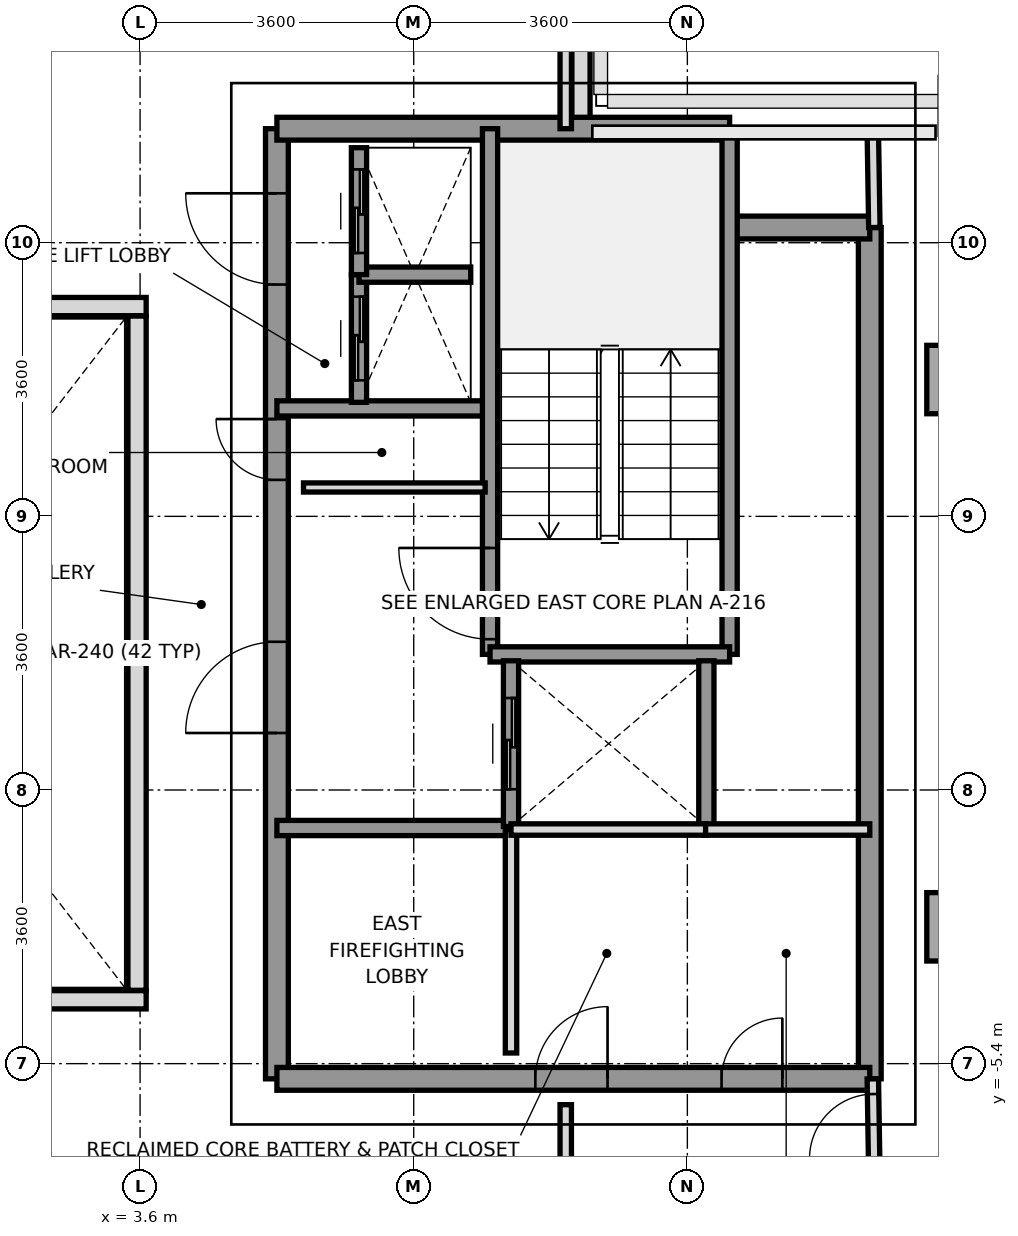
"""IFC4 building model, lengths in metres.
Left out: names, types, materials, properties, quantities, classifications, styles, units other than length and angle.
Written with IfcOpenShell. Run it as: python <this file> out.ifc"""

import sys

from ifc_helpers import new_model, si_unit, direction, frame, frame_2d, origin, origin_2d, place, context, subcontext, project, spatial, rectangle, extrude, source, transform, mapped, element, fill, save


model = new_model("IFC4")
c1 = context("Model", 3, precision=1e-05, world=origin(), true_north=direction((0.0, 1.0)))
c2 = subcontext(c1, "Body", "Model", "MODEL_VIEW")
j1 = project(units=[si_unit("LENGTHUNIT", "METRE"), si_unit("PLANEANGLEUNIT", "RADIAN")], contexts=[c1])
p1 = place(None, origin())
s1 = spatial("IfcSite", under=j1, at=p1, CompositionType="ELEMENT")
p2 = place(p1, origin())
s2 = spatial("IfcBuilding", under=s1, at=p2, CompositionType="ELEMENT")
p3 = place(p2, frame((0.0, 0.0, 239.6)))
s3 = spatial("IfcBuildingStorey", under=s2, at=p3, CompositionType="ELEMENT", Elevation=239.6)
m1 = source(origin(), c2, "Body", "SweptSolid", [
    extrude(rectangle(XDim=0.9, YDim=0.9, at=origin_2d()), origin(), (0.0, 0.0, 1.0), 3.01),
])
for number, where, z_axis, x_axis in (
    (1, (14.4, -3.6, 0.0), (0.0, 0.0, 1.0), (1.0, 0.0, 0.0)),
    (2, (14.4, 3.6, 0.0), (0.0, 0.0, 1.0), (1.0, 0.0, 0.0)),
):
    element("IfcColumn", number, at=place(p3, frame(where, z_axis=z_axis, x_axis=x_axis)), inside=s3, PredefinedType="COLUMN", context=c2, shape_type="MappedRepresentation", body=[
        mapped(m1, transform((0.0, 0.0, 0.0), x_axis=(1.0, 0.0, 0.0), y_axis=(0.0, 1.0, 0.0), z_axis=(0.0, 0.0, 1.0), scale=1.0)),
    ])
p4 = place(p3, frame((9.4, 8.622, 0.0), z_axis=(0.0, 0.0, 1.0), x_axis=(0.0, -1.0, 0.0)))
e3 = element("IfcWall", 3, at=p4, inside=s3, PredefinedType="PARAPET", context=c2, shape_type="SweptSolid", body=[
    extrude(rectangle(XDim=1.669, YDim=0.24, at=frame_2d((0.834, 0.0))), origin(), (0.0, 0.0, 1.0), 1.15),
])
p5 = place(p3, frame((13.2, -5.6, 0.0), z_axis=(0.0, 0.0, 1.0), x_axis=(0.0, 1.0, 0.0)))
e4 = element("IfcWall", 4, at=p5, inside=s3, PredefinedType="SHEAR", context=c2, shape_type="SweptSolid", body=[
    extrude(rectangle(XDim=11.2, YDim=0.3, at=frame_2d((5.6, 0.0))), origin(), (0.0, 0.0, 1.0), 3.01),
])
p6 = place(p3, frame((5.4, -5.6, 0.0), z_axis=(0.0, 0.0, 1.0), x_axis=(0.0, 1.0, 0.0)))
e5 = element("IfcWall", 5, at=p6, inside=s3, PredefinedType="SHEAR", context=c2, shape_type="SweptSolid", body=[
    extrude(rectangle(XDim=12.5, YDim=0.3, at=frame_2d((6.25, 0.0))), origin(), (0.0, 0.0, 1.0), 3.01),
])
p7 = place(p6, frame((4.55, 0.0, 0.0)))
e6 = element("IfcOpeningElement", 6, at=p7, cuts=e5, PredefinedType="OPENING", context=c2, shape_type="SweptSolid", body=[
    extrude(rectangle(XDim=1.2, YDim=2.2, at=frame_2d((0.6, 1.1))), frame((0.0, 0.16, 0.0), z_axis=(0.0, -1.0, 0.0), x_axis=(1.0, 0.0, 0.0)), (0.0, 0.0, 1.0), 0.32),
])
p8 = place(p6, frame((10.45, 0.0, 0.0)))
e7 = element("IfcOpeningElement", 7, at=p8, cuts=e5, PredefinedType="OPENING", context=c2, shape_type="SweptSolid", body=[
    extrude(rectangle(XDim=1.2, YDim=2.2, at=frame_2d((0.6, 1.1))), frame((0.0, 0.16, 0.0), z_axis=(0.0, -1.0, 0.0), x_axis=(1.0, 0.0, 0.0)), (0.0, 0.0, 1.0), 0.32),
])
p9 = place(p6, frame((7.88, 0.0, 0.0)))
e8 = element("IfcOpeningElement", 8, at=p9, cuts=e5, PredefinedType="OPENING", context=c2, shape_type="SweptSolid", body=[
    extrude(rectangle(XDim=0.8, YDim=2.1, at=frame_2d((0.4, 1.05))), frame((0.0, 0.16, 0.0), z_axis=(0.0, -1.0, 0.0), x_axis=(1.0, 0.0, 0.0)), (0.0, 0.0, 1.0), 0.32),
])
p10 = place(p3, frame((5.4, 6.9, 0.0), z_axis=(0.0, 0.0, 1.0), x_axis=(1.0, 0.0, 0.0)))
e9 = element("IfcWall", 9, at=p10, inside=s3, PredefinedType="SHEAR", context=c2, shape_type="SweptSolid", body=[
    extrude(rectangle(XDim=5.956, YDim=0.3, at=frame_2d((2.978, 0.0))), origin(), (0.0, 0.0, 1.0), 3.01),
])
p11 = place(p3, frame((11.356, 5.6, 0.0), z_axis=(0.0, 0.0, 1.0), x_axis=(1.0, 0.0, 0.0)))
e10 = element("IfcWall", 10, at=p11, inside=s3, PredefinedType="SHEAR", context=c2, shape_type="SweptSolid", body=[
    extrude(rectangle(XDim=1.844, YDim=0.3, at=frame_2d((0.922, 0.0))), origin(), (0.0, 0.0, 1.0), 3.01),
])
p12 = place(p3, frame((5.4, -5.6, 0.0), z_axis=(0.0, 0.0, 1.0), x_axis=(1.0, 0.0, 0.0)))
e11 = element("IfcWall", 11, at=p12, inside=s3, PredefinedType="SHEAR", context=c2, shape_type="SweptSolid", body=[
    extrude(rectangle(XDim=7.8, YDim=0.3, at=frame_2d((3.9, 0.0))), origin(), (0.0, 0.0, 1.0), 3.01),
])
p13 = place(p12, frame((5.85, 0.0, 0.0)))
e12 = element("IfcOpeningElement", 12, at=p13, cuts=e11, PredefinedType="OPENING", context=c2, shape_type="SweptSolid", body=[
    extrude(rectangle(XDim=0.8, YDim=2.1, at=frame_2d((0.4, 1.05))), frame((0.0, 0.16, 0.0), z_axis=(0.0, -1.0, 0.0), x_axis=(1.0, 0.0, 0.0)), (0.0, 0.0, 1.0), 0.32),
])
p14 = place(p12, frame((3.4, 0.0, 0.0)))
e13 = element("IfcOpeningElement", 13, at=p14, cuts=e11, PredefinedType="OPENING", context=c2, shape_type="SweptSolid", body=[
    extrude(rectangle(XDim=0.95, YDim=2.15, at=frame_2d((0.475, 1.075))), frame((0.0, 0.16, 0.0), z_axis=(0.0, -1.0, 0.0), x_axis=(1.0, 0.0, 0.0)), (0.0, 0.0, 1.0), 0.32),
])
p15 = place(p3, frame((5.4, 3.22, 0.0), z_axis=(0.0, 0.0, 1.0), x_axis=(1.0, 0.0, 0.0)))
e14 = element("IfcWall", 14, at=p15, inside=s3, PredefinedType="SOLIDWALL", context=c2, shape_type="SweptSolid", body=[
    extrude(rectangle(XDim=2.78, YDim=0.2, at=frame_2d((1.39, 0.0))), origin(), (0.0, 0.0, 1.0), 3.01),
])
p16 = place(p3, frame((5.4, -2.3, 0.0), z_axis=(0.0, 0.0, 1.0), x_axis=(1.0, 0.0, 0.0)))
e15 = element("IfcWall", 15, at=p16, inside=s3, PredefinedType="SOLIDWALL", context=c2, shape_type="SweptSolid", body=[
    extrude(rectangle(XDim=3.08, YDim=0.2, at=frame_2d((1.54, 0.0))), origin(), (0.0, 0.0, 1.0), 3.01),
])
p17 = place(p3, frame((8.204, -0.016, 0.0), z_axis=(0.0, 0.0, 1.0), x_axis=(0.0, 1.0, 0.0)))
e16 = element("IfcWall", 16, at=p17, inside=s3, PredefinedType="SOLIDWALL", context=c2, shape_type="SweptSolid", body=[
    extrude(rectangle(XDim=6.916, YDim=0.2, at=frame_2d((3.458, 0.0))), origin(), (0.0, 0.0, 1.0), 3.01),
])
p18 = place(p17, frame((0.2, 0.0, 0.0)))
e17 = element("IfcOpeningElement", 17, at=p18, cuts=e16, PredefinedType="OPENING", context=c2, shape_type="SweptSolid", body=[
    extrude(rectangle(XDim=1.2, YDim=2.2, at=frame_2d((0.6, 1.1))), frame((0.0, 0.11, 0.0), z_axis=(0.0, -1.0, 0.0), x_axis=(1.0, 0.0, 0.0)), (0.0, 0.0, 1.0), 0.22),
])
p19 = place(p3, frame((11.356, -0.016, 0.0), z_axis=(0.0, 0.0, 1.0), x_axis=(0.0, 1.0, 0.0)))
e18 = element("IfcWall", 18, at=p19, inside=s3, PredefinedType="SOLIDWALL", context=c2, shape_type="SweptSolid", body=[
    extrude(rectangle(XDim=6.916, YDim=0.2, at=frame_2d((3.458, 0.0))), origin(), (0.0, 0.0, 1.0), 3.01),
])
p20 = place(p3, frame((8.204, -0.016, 0.0), z_axis=(0.0, 0.0, 1.0), x_axis=(1.0, 0.0, 0.0)))
e19 = element("IfcWall", 19, at=p20, inside=s3, PredefinedType="SOLIDWALL", context=c2, shape_type="SweptSolid", body=[
    extrude(rectangle(XDim=3.152, YDim=0.2, at=frame_2d((1.576, 0.0))), origin(), (0.0, 0.0, 1.0), 3.01),
])
p21 = place(p3, frame((8.48, -2.28, 0.0), z_axis=(0.0, 0.0, 1.0), x_axis=(0.0, 1.0, 0.0)))
e20 = element("IfcWall", 20, at=p21, inside=s3, PredefinedType="SOLIDWALL", context=c2, shape_type="SweptSolid", body=[
    extrude(rectangle(XDim=2.18, YDim=0.2, at=frame_2d((1.09, 0.0))), origin(), (0.0, 0.0, 1.0), 3.01),
])
p22 = place(p21, frame((0.49, 0.0, 0.0)))
e21 = element("IfcOpeningElement", 21, at=p22, cuts=e20, PredefinedType="OPENING", context=c2, shape_type="SweptSolid", body=[
    extrude(rectangle(XDim=1.2, YDim=2.2, at=frame_2d((0.6, 1.1))), frame((0.0, 0.11, 0.0), z_axis=(0.0, -1.0, 0.0), x_axis=(1.0, 0.0, 0.0)), (0.0, 0.0, 1.0), 0.22),
])
p23 = place(p3, frame((11.05, -2.28, 0.0), z_axis=(0.0, 0.0, 1.0), x_axis=(0.0, 1.0, 0.0)))
e22 = element("IfcWall", 22, at=p23, inside=s3, PredefinedType="SOLIDWALL", context=c2, shape_type="SweptSolid", body=[
    extrude(rectangle(XDim=2.18, YDim=0.2, at=frame_2d((1.09, 0.0))), origin(), (0.0, 0.0, 1.0), 3.01),
])
p24 = place(p3, frame((6.48, 3.3, 0.0), z_axis=(0.0, 0.0, 1.0), x_axis=(0.0, 1.0, 0.0)))
e23 = element("IfcWall", 23, at=p24, inside=s3, PredefinedType="SOLIDWALL", context=c2, shape_type="SweptSolid", body=[
    extrude(rectangle(XDim=1.68, YDim=0.2, at=frame_2d((0.84, 0.0))), origin(), (0.0, 0.0, 1.0), 3.01),
])
p25 = place(p24, frame((0.29, 0.0, 0.0)))
e24 = element("IfcOpeningElement", 24, at=p25, cuts=e23, PredefinedType="OPENING", context=c2, shape_type="SweptSolid", body=[
    extrude(rectangle(XDim=1.1, YDim=2.2, at=frame_2d((0.55, 1.1))), frame((0.0, 0.11, 0.0), z_axis=(0.0, -1.0, 0.0), x_axis=(1.0, 0.0, 0.0)), (0.0, 0.0, 1.0), 0.22),
])
p26 = place(p3, frame((6.48, 4.98, 0.0), z_axis=(0.0, 0.0, 1.0), x_axis=(1.0, 0.0, 0.0)))
e25 = element("IfcWall", 25, at=p26, inside=s3, PredefinedType="SOLIDWALL", context=c2, shape_type="SweptSolid", body=[
    extrude(rectangle(XDim=1.47, YDim=0.2, at=frame_2d((0.735, 0.0))), origin(), (0.0, 0.0, 1.0), 3.01),
])
p27 = place(p3, frame((6.48, 4.98, 0.0), z_axis=(0.0, 0.0, 1.0), x_axis=(0.0, 1.0, 0.0)))
e26 = element("IfcWall", 26, at=p27, inside=s3, PredefinedType="SOLIDWALL", context=c2, shape_type="SweptSolid", body=[
    extrude(rectangle(XDim=1.67, YDim=0.2, at=frame_2d((0.835, 0.0))), origin(), (0.0, 0.0, 1.0), 3.01),
])
p28 = place(p27, frame((0.285, 0.0, 0.0)))
e27 = element("IfcOpeningElement", 27, at=p28, cuts=e26, PredefinedType="OPENING", context=c2, shape_type="SweptSolid", body=[
    extrude(rectangle(XDim=1.1, YDim=2.2, at=frame_2d((0.55, 1.1))), frame((0.0, 0.11, 0.0), z_axis=(0.0, -1.0, 0.0), x_axis=(1.0, 0.0, 0.0)), (0.0, 0.0, 1.0), 0.22),
])
p29 = place(p3, frame((5.75, 2.18, 0.0), z_axis=(0.0, 0.0, 1.0), x_axis=(1.0, 0.0, 0.0)))
e28 = element("IfcWall", 28, at=p29, inside=s3, PredefinedType="PARTITIONING", context=c2, shape_type="SweptSolid", body=[
    extrude(rectangle(XDim=2.39, YDim=0.12, at=frame_2d((1.195, 0.0))), origin(), (0.0, 0.0, 1.0), 3.01),
])
p30 = place(p3, frame((11.02, -2.32, 0.0), z_axis=(0.0, 0.0, 1.0), x_axis=(1.0, 0.0, 0.0)))
e29 = element("IfcWall", 29, at=p30, inside=s3, PredefinedType="PARTITIONING", context=c2, shape_type="SweptSolid", body=[
    extrude(rectangle(XDim=2.18, YDim=0.15, at=frame_2d((1.09, 0.0))), origin(), (0.0, 0.0, 1.0), 3.01),
])
p31 = place(p3, frame((8.48, -5.26, 0.0), z_axis=(0.0, 0.0, 1.0), x_axis=(0.0, 1.0, 0.0)))
e30 = element("IfcWall", 30, at=p31, inside=s3, PredefinedType="PARTITIONING", context=c2, shape_type="SweptSolid", body=[
    extrude(rectangle(XDim=2.94, YDim=0.15, at=frame_2d((1.47, 0.0))), origin(), (0.0, 0.0, 1.0), 3.01),
])
p32 = place(p3, frame((8.48, -2.32, 0.0), z_axis=(0.0, 0.0, 1.0), x_axis=(1.0, 0.0, 0.0)))
e31 = element("IfcWall", 31, at=p32, inside=s3, PredefinedType="PARTITIONING", context=c2, shape_type="SweptSolid", body=[
    extrude(rectangle(XDim=2.56, YDim=0.15, at=frame_2d((1.28, 0.0))), origin(), (0.0, 0.0, 1.0), 3.01),
])
p33 = place(p3, frame((9.2, 6.9, 0.0), z_axis=(0.0, 0.0, 1.0), x_axis=(0.0, 1.0, 0.0)))
e32 = element("IfcWall", 32, at=p33, inside=s3, PredefinedType="PARTITIONING", context=c2, shape_type="SweptSolid", body=[
    extrude(rectangle(XDim=3.38, YDim=0.15, at=frame_2d((1.69, 0.0))), origin(), (0.0, 0.0, 1.0), 2.61),
])
p34 = place(p3, frame((9.2, -10.28, 0.0), z_axis=(0.0, 0.0, 1.0), x_axis=(0.0, 1.0, 0.0)))
e33 = element("IfcWall", 33, at=p34, inside=s3, PredefinedType="PARTITIONING", context=c2, shape_type="SweptSolid", body=[
    extrude(rectangle(XDim=4.34, YDim=0.15, at=frame_2d((2.17, 0.0))), origin(), (0.0, 0.0, 1.0), 2.61),
])
p35 = place(p3, frame((13.26, 5.6, 0.0), z_axis=(0.0, 0.0, 1.0), x_axis=(-0.016013571389, 0.999871774545, 0.0)))
e34 = element("IfcWall", 34, at=p35, inside=s3, PredefinedType="PARTITIONING", context=c2, shape_type="SweptSolid", body=[
    extrude(rectangle(XDim=1.25, YDim=0.15, at=frame_2d((0.625, 0.0))), origin(), (0.0, 0.0, 1.0), 3.01),
])
p36 = place(p3, frame((13.26, -6.85, 0.0), z_axis=(0.0, 0.0, 1.0), x_axis=(-0.016013571389, 0.999871774545, 0.0)))
e35 = element("IfcWall", 35, at=p36, inside=s3, PredefinedType="PARTITIONING", context=c2, shape_type="SweptSolid", body=[
    extrude(rectangle(XDim=1.25, YDim=0.15, at=frame_2d((0.625, 0.0))), origin(), (0.0, 0.0, 1.0), 3.01),
])
p37 = place(p36, frame((0.2, 0.0, 0.0)))
e36 = element("IfcOpeningElement", 36, at=p37, cuts=e35, PredefinedType="OPENING", context=c2, shape_type="SweptSolid", body=[
    extrude(rectangle(XDim=0.85, YDim=2.1, at=frame_2d((0.425, 1.05))), frame((0.0, 0.085, 0.0), z_axis=(0.0, -1.0, 0.0), x_axis=(1.0, 0.0, 0.0)), (0.0, 0.0, 1.0), 0.17),
])
for number, where, z_axis, x_axis in (
    (37, (-3.68, -4.56, 0.0), (0.0, 0.0, 1.0), (1.0, 0.0, 0.0)),
    (38, (-3.68, 4.56, 0.0), (0.0, 0.0, 1.0), (1.0, 0.0, 0.0)),
):
    element("IfcWall", number, at=place(p3, frame(where, z_axis=z_axis, x_axis=x_axis)), inside=s3, PredefinedType="PARAPET", context=c2, shape_type="SweptSolid", body=[
        extrude(rectangle(XDim=7.36, YDim=0.24, at=frame_2d((3.68, 0.0))), origin(), (0.0, 0.0, 1.0), 1.15),
    ])
p38 = place(p3, frame((3.56, -4.435, 0.0), z_axis=(0.0, 0.0, 1.0), x_axis=(0.0, 1.0, 0.0)))
e39 = element("IfcWall", 39, at=p38, inside=s3, PredefinedType="PARAPET", context=c2, shape_type="SweptSolid", body=[
    extrude(rectangle(XDim=8.87, YDim=0.24, at=frame_2d((4.435, 0.0))), origin(), (0.0, 0.0, 1.0), 1.15),
])
m2 = source(origin(), c2, "Body", "SweptSolid", [
    extrude(rectangle(XDim=1.2, YDim=2.2, at=frame_2d((0.6, 1.1))), frame((0.0, 0.025, 0.0), z_axis=(0.0, -1.0, 0.0), x_axis=(1.0, 0.0, 0.0)), (0.0, 0.0, 1.0), 0.05),
])
p39 = place(p18, origin())
e40 = element("IfcDoor", 40, at=p39, inside=s3, OperationType="SINGLE_SWING_RIGHT", PredefinedType="DOOR", context=c2, shape_type="MappedRepresentation", body=[
    mapped(m2, transform((0.0, 0.0, 0.0), x_axis=(1.0, 0.0, 0.0), y_axis=(0.0, 1.0, 0.0), z_axis=(0.0, 0.0, 1.0), scale=1.0)),
])
fill(e17, e40)
p40 = place(p7, origin())
e41 = element("IfcDoor", 41, at=p40, inside=s3, OperationType="SINGLE_SWING_LEFT", PredefinedType="DOOR", context=c2, shape_type="MappedRepresentation", body=[
    mapped(m2, transform((0.0, 0.0, 0.0), x_axis=(1.0, 0.0, 0.0), y_axis=(0.0, 1.0, 0.0), z_axis=(0.0, 0.0, 1.0), scale=1.0)),
])
fill(e6, e41)
p41 = place(p8, origin())
e42 = element("IfcDoor", 42, at=p41, inside=s3, OperationType="SINGLE_SWING_RIGHT", PredefinedType="DOOR", context=c2, shape_type="MappedRepresentation", body=[
    mapped(m2, transform((0.0, 0.0, 0.0), x_axis=(1.0, 0.0, 0.0), y_axis=(0.0, 1.0, 0.0), z_axis=(0.0, 0.0, 1.0), scale=1.0)),
])
fill(e7, e42)
m3 = source(origin(), c2, "Body", "SweptSolid", [
    extrude(rectangle(XDim=0.8, YDim=2.1, at=frame_2d((0.4, 1.05))), frame((0.0, 0.025, 0.0), z_axis=(0.0, -1.0, 0.0), x_axis=(1.0, 0.0, 0.0)), (0.0, 0.0, 1.0), 0.05),
])
p42 = place(p9, origin())
e43 = element("IfcDoor", 43, at=p42, inside=s3, OperationType="SINGLE_SWING_RIGHT", PredefinedType="DOOR", context=c2, shape_type="MappedRepresentation", body=[
    mapped(m3, transform((0.0, 0.0, 0.0), x_axis=(1.0, 0.0, 0.0), y_axis=(0.0, 1.0, 0.0), z_axis=(0.0, 0.0, 1.0), scale=1.0)),
])
fill(e8, e43)
p43 = place(p13, origin())
e44 = element("IfcDoor", 44, at=p43, inside=s3, OperationType="SINGLE_SWING_RIGHT", PredefinedType="DOOR", context=c2, shape_type="MappedRepresentation", body=[
    mapped(m3, transform((0.0, 0.0, 0.0), x_axis=(1.0, 0.0, 0.0), y_axis=(0.0, 1.0, 0.0), z_axis=(0.0, 0.0, 1.0), scale=1.0)),
])
fill(e12, e44)
m4 = source(origin(), c2, "Body", "SweptSolid", [
    extrude(rectangle(XDim=0.95, YDim=2.15, at=frame_2d((0.475, 1.075))), frame((0.0, 0.025, 0.0), z_axis=(0.0, -1.0, 0.0), x_axis=(1.0, 0.0, 0.0)), (0.0, 0.0, 1.0), 0.05),
])
p44 = place(p14, origin())
e45 = element("IfcDoor", 45, at=p44, inside=s3, OperationType="SINGLE_SWING_RIGHT", PredefinedType="DOOR", context=c2, shape_type="MappedRepresentation", body=[
    mapped(m4, transform((0.0, 0.0, 0.0), x_axis=(1.0, 0.0, 0.0), y_axis=(0.0, 1.0, 0.0), z_axis=(0.0, 0.0, 1.0), scale=1.0)),
])
fill(e13, e45)
p45 = place(p22, origin())
e46 = element("IfcDoor", 46, at=p45, inside=s3, OperationType="SLIDING_TO_RIGHT", PredefinedType="DOOR", context=c2, shape_type="MappedRepresentation", body=[
    mapped(m2, transform((0.0, 0.0, 0.0), x_axis=(1.0, 0.0, 0.0), y_axis=(0.0, 1.0, 0.0), z_axis=(0.0, 0.0, 1.0), scale=1.0)),
])
fill(e21, e46)
m5 = source(origin(), c2, "Body", "SweptSolid", [
    extrude(rectangle(XDim=1.1, YDim=2.2, at=frame_2d((0.55, 1.1))), frame((0.0, 0.025, 0.0), z_axis=(0.0, -1.0, 0.0), x_axis=(1.0, 0.0, 0.0)), (0.0, 0.0, 1.0), 0.05),
])
p46 = place(p25, origin())
e47 = element("IfcDoor", 47, at=p46, inside=s3, OperationType="SLIDING_TO_LEFT", PredefinedType="DOOR", context=c2, shape_type="MappedRepresentation", body=[
    mapped(m5, transform((0.0, 0.0, 0.0), x_axis=(1.0, 0.0, 0.0), y_axis=(0.0, 1.0, 0.0), z_axis=(0.0, 0.0, 1.0), scale=1.0)),
])
fill(e24, e47)
p47 = place(p28, origin())
e48 = element("IfcDoor", 48, at=p47, inside=s3, OperationType="SLIDING_TO_LEFT", PredefinedType="DOOR", context=c2, shape_type="MappedRepresentation", body=[
    mapped(m5, transform((0.0, 0.0, 0.0), x_axis=(1.0, 0.0, 0.0), y_axis=(0.0, 1.0, 0.0), z_axis=(0.0, 0.0, 1.0), scale=1.0)),
])
fill(e27, e48)
m6 = source(origin(), c2, "Body", "SweptSolid", [
    extrude(rectangle(XDim=0.85, YDim=2.1, at=frame_2d((0.425, 1.05))), frame((0.0, 0.025, 0.0), z_axis=(0.0, -1.0, 0.0), x_axis=(1.0, 0.0, 0.0)), (0.0, 0.0, 1.0), 0.05),
])
p48 = place(p37, origin())
e49 = element("IfcDoor", 49, at=p48, inside=s3, OperationType="SINGLE_SWING_LEFT", PredefinedType="DOOR", context=c2, shape_type="MappedRepresentation", body=[
    mapped(m6, transform((0.0, 0.0, 0.0), x_axis=(1.0, 0.0, 0.0), y_axis=(0.0, 1.0, 0.0), z_axis=(0.0, 0.0, 1.0), scale=1.0)),
])
fill(e36, e49)
save(model, sys.argv[1])
